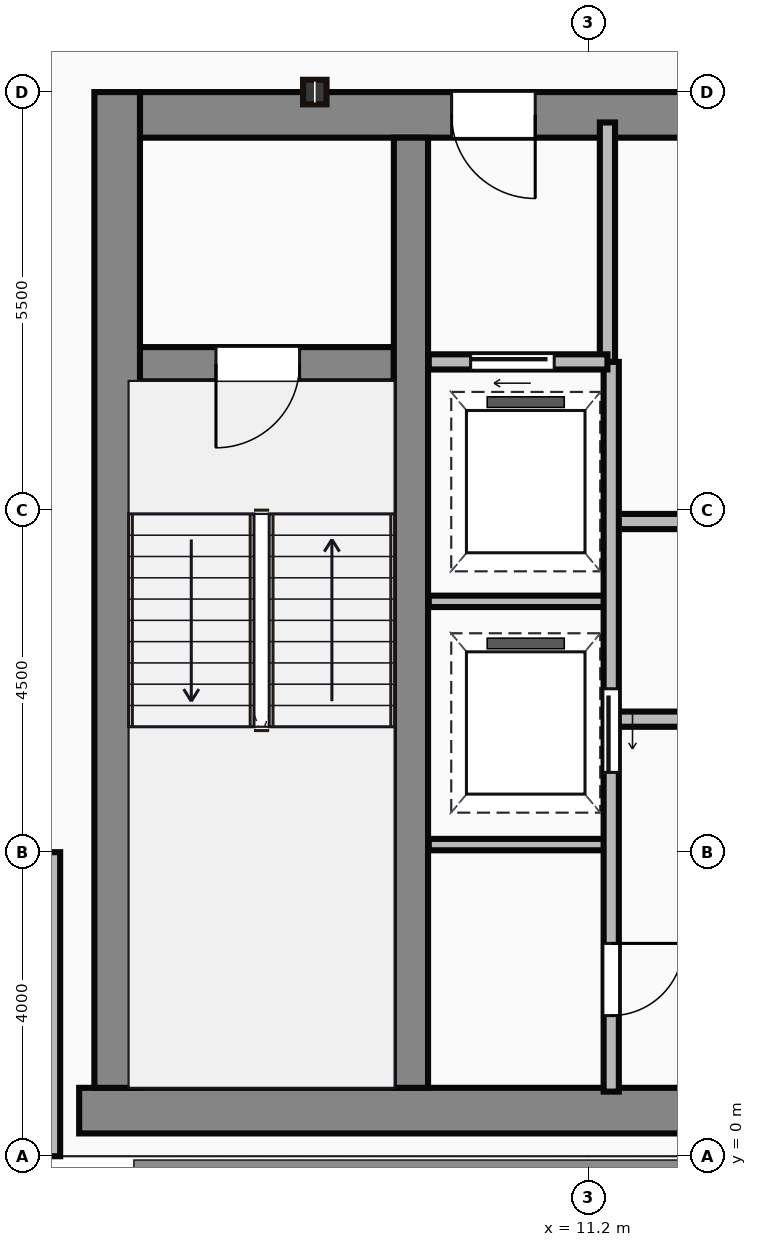
"""IFC4 building model, lengths in metres.
Left out: names, types, materials, properties, quantities, classifications, styles, units other than length and angle.
Written with IfcOpenShell. Run it as: python <this file> out.ifc"""

import sys

from ifc_helpers import new_model, si_unit, direction, frame, frame_2d, origin, origin_2d, place, context, subcontext, project, spatial, rectangle, i_section, extrude, source, transform, mapped, element, fill, save


model = new_model("IFC4")
c1 = context("Model", 3, precision=1e-05, world=origin(), true_north=direction((0.0, 1.0)))
c2 = subcontext(c1, "Body", "Model", "MODEL_VIEW")
j1 = project(units=[si_unit("LENGTHUNIT", "METRE"), si_unit("PLANEANGLEUNIT", "RADIAN")], contexts=[c1])
p1 = place(None, origin())
s1 = spatial("IfcSite", under=j1, at=p1, CompositionType="ELEMENT")
p2 = place(p1, origin())
s2 = spatial("IfcBuilding", under=s1, at=p2, CompositionType="ELEMENT")
p3 = place(p2, frame((0.0, 0.0, 299.85)))
s3 = spatial("IfcBuildingStorey", under=s2, at=p3, CompositionType="ELEMENT", Elevation=299.85)
m1 = source(origin(), c2, "Body", "SweptSolid", [
    extrude(rectangle(XDim=29.5, YDim=0.6, at=frame_2d((14.75, 0.0))), origin(), (0.0, 0.0, 1.0), 3.8),
])
p4 = place(p3, frame((4.5, 0.6, 0.0), z_axis=(0.0, 0.0, 1.0), x_axis=(1.0, 0.0, 0.0)))
e1 = element("IfcWall", 1, at=p4, inside=s3, PredefinedType="SHEAR", context=c2, shape_type="MappedRepresentation", body=[
    mapped(m1, transform((0.0, 0.0, 0.0))),
])
m2 = source(origin(), c2, "Body", "SweptSolid", [
    extrude(rectangle(XDim=13.1, YDim=0.6, at=frame_2d((6.55, 0.0))), origin(), (0.0, 0.0, 1.0), 3.8),
])
p5 = place(p3, frame((5.0, 0.9, 0.0), z_axis=(0.0, 0.0, 1.0), x_axis=(0.0, 1.0, 0.0)))
e2 = element("IfcWall", 2, at=p5, inside=s3, PredefinedType="SHEAR", context=c2, shape_type="MappedRepresentation", body=[
    mapped(m2, transform((0.0, 0.0, 0.0))),
])
m3 = source(origin(), c2, "Body", "SweptSolid", [
    extrude(rectangle(XDim=9.1, YDim=0.6, at=frame_2d((4.55, 0.0))), origin(), (0.0, 0.0, 1.0), 3.8),
])
p6 = place(p3, frame((5.3, 13.7, 0.0), z_axis=(0.0, 0.0, 1.0), x_axis=(1.0, 0.0, 0.0)))
e3 = element("IfcWall", 3, at=p6, inside=s3, PredefinedType="SHEAR", context=c2, shape_type="MappedRepresentation", body=[
    mapped(m3, transform((0.0, 0.0, 0.0))),
])
p7 = place(p6, frame((4.1, 0.0, 0.0)))
e4 = element("IfcOpeningElement", 4, at=p7, cuts=e3, PredefinedType="OPENING", context=c2, shape_type="SweptSolid", body=[
    extrude(rectangle(XDim=1.1, YDim=2.15, at=frame_2d((0.55, 1.075))), frame((0.0, 0.31, 0.0), z_axis=(0.0, -1.0, 0.0), x_axis=(1.0, 0.0, 0.0)), (0.0, 0.0, 1.0), 0.62),
])
m4 = source(origin(), c2, "Body", "SweptSolid", [
    extrude(rectangle(XDim=12.5, YDim=0.45, at=frame_2d((6.25, 0.0))), origin(), (0.0, 0.0, 1.0), 3.8),
])
p8 = place(p3, frame((8.865, 0.9, 0.0), z_axis=(0.0, 0.0, 1.0), x_axis=(0.0, 1.0, 0.0)))
e5 = element("IfcWall", 5, at=p8, inside=s3, PredefinedType="SHEAR", context=c2, shape_type="MappedRepresentation", body=[
    mapped(m4, transform((0.0, 0.0, 0.0))),
])
m5 = source(origin(), c2, "Body", "SweptSolid", [
    extrude(rectangle(XDim=3.39, YDim=0.45, at=frame_2d((1.695, 0.0))), origin(), (0.0, 0.0, 1.0), 3.8),
])
p9 = place(p3, frame((5.25, 10.42, 0.0), z_axis=(0.0, 0.0, 1.0), x_axis=(1.0, 0.0, 0.0)))
e6 = element("IfcWall", 6, at=p9, inside=s3, PredefinedType="SHEAR", context=c2, shape_type="MappedRepresentation", body=[
    mapped(m5, transform((0.0, 0.0, 0.0))),
])
p10 = place(p9, frame((1.05, 0.0, 0.0)))
e7 = element("IfcOpeningElement", 7, at=p10, cuts=e6, PredefinedType="OPENING", context=c2, shape_type="SweptSolid", body=[
    extrude(rectangle(XDim=1.1, YDim=2.15, at=frame_2d((0.55, 1.075))), frame((0.0, 0.235, 0.0), z_axis=(0.0, -1.0, 0.0), x_axis=(1.0, 0.0, 0.0)), (0.0, 0.0, 1.0), 0.47),
])
m6 = source(origin(), c2, "Body", "SweptSolid", [
    extrude(i_section(OverallWidth=0.309, OverallDepth=0.323, WebThickness=0.014, FlangeThickness=0.023, at=origin_2d()), origin(), (0.0, 0.0, 1.0), 3.8),
])
p11 = place(p3, frame((7.6, 14.0, 0.0), z_axis=(0.0, 0.0, 1.0), x_axis=(1.0, 0.0, 0.0)))
e8 = element("IfcColumn", 8, at=p11, inside=s3, PredefinedType="COLUMN", context=c2, shape_type="MappedRepresentation", body=[
    mapped(m6, transform((0.0, 0.0, 0.0))),
])
m7 = source(origin(), c2, "Body", "SweptSolid", [
    extrude(rectangle(XDim=4.0, YDim=0.25, at=frame_2d((2.0, 0.0))), origin(), (0.0, 0.0, 1.0), 3.5),
])
p12 = place(p3, frame((4.125, 4.0, 0.0), z_axis=(0.0, 0.0, 1.0), x_axis=(0.0, -1.0, 0.0)))
e9 = element("IfcWall", 9, at=p12, inside=s3, PredefinedType="STANDARD", context=c2, shape_type="MappedRepresentation", body=[
    mapped(m7, transform((0.0, 0.0, 0.0))),
])
m8 = source(origin(), c2, "Body", "SweptSolid", [
    extrude(rectangle(XDim=3.18, YDim=0.2, at=frame_2d((1.59, 0.0))), origin(), (0.0, 0.0, 1.0), 3.5),
])
p13 = place(p3, frame((11.45, 10.42, 0.0), z_axis=(0.0, 0.0, 1.0), x_axis=(0.0, 1.0, 0.0)))
e10 = element("IfcWall", 10, at=p13, inside=s3, PredefinedType="PARTITIONING", context=c2, shape_type="MappedRepresentation", body=[
    mapped(m8, transform((0.0, 0.0, 0.0))),
])
m9 = source(origin(), c2, "Body", "SweptSolid", [
    extrude(rectangle(XDim=2.35, YDim=0.2, at=frame_2d((1.175, 0.0))), origin(), (0.0, 0.0, 1.0), 3.5),
])
p14 = place(p3, frame((9.1, 10.45, 0.0), z_axis=(0.0, 0.0, 1.0), x_axis=(1.0, 0.0, 0.0)))
e11 = element("IfcWall", 11, at=p14, inside=s3, PredefinedType="PARTITIONING", context=c2, shape_type="MappedRepresentation", body=[
    mapped(m9, transform((0.0, 0.0, 0.0))),
])
p15 = place(p14, frame((0.55, 0.0, 0.0)))
e12 = element("IfcOpeningElement", 12, at=p15, cuts=e11, PredefinedType="OPENING", context=c2, shape_type="SweptSolid", body=[
    extrude(rectangle(XDim=1.1, YDim=2.15, at=frame_2d((0.55, 1.075))), frame((0.0, 0.11, 0.0), z_axis=(0.0, -1.0, 0.0), x_axis=(1.0, 0.0, 0.0)), (0.0, 0.0, 1.0), 0.22),
])
m10 = source(origin(), c2, "Body", "SweptSolid", [
    extrude(rectangle(XDim=9.6, YDim=0.2, at=frame_2d((4.8, 0.0))), origin(), (0.0, 0.0, 1.0), 3.5),
])
p16 = place(p3, frame((11.5, 0.85, 0.0), z_axis=(0.0, 0.0, 1.0), x_axis=(0.0, 1.0, 0.0)))
e13 = element("IfcWall", 13, at=p16, inside=s3, PredefinedType="PARTITIONING", context=c2, shape_type="MappedRepresentation", body=[
    mapped(m10, transform((0.0, 0.0, 0.0))),
])
p17 = place(p16, frame((4.2, 0.0, 0.0)))
e14 = element("IfcOpeningElement", 14, at=p17, cuts=e13, PredefinedType="OPENING", context=c2, shape_type="SweptSolid", body=[
    extrude(rectangle(XDim=1.1, YDim=2.15, at=frame_2d((0.55, 1.075))), frame((0.0, 0.11, 0.0), z_axis=(0.0, -1.0, 0.0), x_axis=(1.0, 0.0, 0.0)), (0.0, 0.0, 1.0), 0.22),
])
p18 = place(p16, frame((1.0, 0.0, 0.0)))
e15 = element("IfcOpeningElement", 15, at=p18, cuts=e13, PredefinedType="OPENING", context=c2, shape_type="SweptSolid", body=[
    extrude(rectangle(XDim=0.95, YDim=2.15, at=frame_2d((0.475, 1.075))), frame((0.0, 0.11, 0.0), z_axis=(0.0, -1.0, 0.0), x_axis=(1.0, 0.0, 0.0)), (0.0, 0.0, 1.0), 0.22),
])
m11 = source(origin(), c2, "Body", "SweptSolid", [
    extrude(rectangle(XDim=2.4, YDim=0.15, at=frame_2d((1.2, 0.0))), origin(), (0.0, 0.0, 1.0), 3.5),
])
for number, where, z_axis, x_axis in (
    (16, (9.1, 4.1, 0.0), (0.0, 0.0, 1.0), (1.0, 0.0, 0.0)),
    (17, (9.1, 7.3, 0.0), (0.0, 0.0, 1.0), (1.0, 0.0, 0.0)),
):
    element("IfcWall", number, at=place(p3, frame(where, z_axis=z_axis, x_axis=x_axis)), inside=s3, PredefinedType="PARTITIONING", context=c2, shape_type="MappedRepresentation", body=[
        mapped(m11, transform((0.0, 0.0, 0.0))),
    ])
m12 = source(origin(), c2, "Body", "SweptSolid", [
    extrude(rectangle(XDim=11.85, YDim=0.2, at=frame_2d((5.925, 0.0))), origin(), (0.0, 0.0, 1.0), 3.5),
])
p19 = place(p3, frame((11.55, 5.75, 0.0), z_axis=(0.0, 0.0, 1.0), x_axis=(1.0, 0.0, 0.0)))
e18 = element("IfcWall", 18, at=p19, inside=s3, PredefinedType="PARTITIONING", context=c2, shape_type="MappedRepresentation", body=[
    mapped(m12, transform((0.0, 0.0, 0.0))),
])
p20 = place(p19, frame((5.2, 0.0, 0.0)))
e19 = element("IfcOpeningElement", 19, at=p20, cuts=e18, PredefinedType="OPENING", context=c2, shape_type="SweptSolid", body=[
    extrude(rectangle(XDim=1.1, YDim=2.15, at=frame_2d((0.55, 1.075))), frame((0.0, 0.11, 0.0), z_axis=(0.0, -1.0, 0.0), x_axis=(1.0, 0.0, 0.0)), (0.0, 0.0, 1.0), 0.22),
])
p21 = place(p3, frame((11.55, 8.35, 0.0), z_axis=(0.0, 0.0, 1.0), x_axis=(1.0, 0.0, 0.0)))
e20 = element("IfcWall", 20, at=p21, inside=s3, PredefinedType="PARTITIONING", context=c2, shape_type="MappedRepresentation", body=[
    mapped(m12, transform((0.0, 0.0, 0.0))),
])
m13 = source(origin(), c2, "Body", "SweptSolid", [
    extrude(rectangle(XDim=1.1, YDim=2.15, at=frame_2d((0.55, 1.075))), frame((0.0, 0.025, 0.0), z_axis=(0.0, -1.0, 0.0), x_axis=(1.0, 0.0, 0.0)), (0.0, 0.0, 1.0), 0.05),
])
p22 = place(p10, frame((1.1, 0.0, 0.0), z_axis=(0.0, 0.0, 1.0), x_axis=(-1.0, 0.0, 0.0)))
e21 = element("IfcDoor", 21, at=p22, inside=s3, OperationType="SINGLE_SWING_LEFT", PredefinedType="DOOR", context=c2, shape_type="MappedRepresentation", body=[
    mapped(m13, transform((0.0, 0.0, 0.0))),
])
fill(e7, e21)
p23 = place(p7, origin())
e22 = element("IfcDoor", 22, at=p23, inside=s3, OperationType="SINGLE_SWING_RIGHT", PredefinedType="DOOR", context=c2, shape_type="MappedRepresentation", body=[
    mapped(m13, transform((0.0, 0.0, 0.0))),
])
fill(e4, e22)
p24 = place(p15, origin())
e23 = element("IfcDoor", 23, at=p24, inside=s3, OperationType="SLIDING_TO_LEFT", PredefinedType="DOOR", context=c2, shape_type="MappedRepresentation", body=[
    mapped(m13, transform((0.0, 0.0, 0.0))),
])
fill(e12, e23)
p25 = place(p17, frame((1.1, 0.0, 0.0), z_axis=(0.0, 0.0, 1.0), x_axis=(-1.0, 0.0, 0.0)))
e24 = element("IfcDoor", 24, at=p25, inside=s3, OperationType="SLIDING_TO_LEFT", PredefinedType="DOOR", context=c2, shape_type="MappedRepresentation", body=[
    mapped(m13, transform((0.0, 0.0, 0.0))),
])
fill(e14, e24)
m14 = source(origin(), c2, "Body", "SweptSolid", [
    extrude(rectangle(XDim=0.95, YDim=2.15, at=frame_2d((0.475, 1.075))), frame((0.0, 0.025, 0.0), z_axis=(0.0, -1.0, 0.0), x_axis=(1.0, 0.0, 0.0)), (0.0, 0.0, 1.0), 0.05),
])
p26 = place(p18, frame((0.95, 0.0, 0.0), z_axis=(0.0, 0.0, 1.0), x_axis=(-1.0, 0.0, 0.0)))
e25 = element("IfcDoor", 25, at=p26, inside=s3, OperationType="SINGLE_SWING_RIGHT", PredefinedType="DOOR", context=c2, shape_type="MappedRepresentation", body=[
    mapped(m14, transform((0.0, 0.0, 0.0))),
])
fill(e15, e25)
save(model, sys.argv[1])
